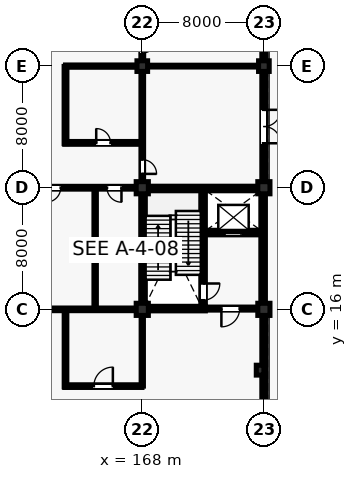
"""IFC4 building model, lengths in metres.
Left out: names, types, materials, properties, quantities, classifications, styles, units other than length and angle.
Written with IfcOpenShell. Run it as: python <this file> out.ifc"""

import sys

from ifc_helpers import new_model, si_unit, direction, frame, frame_2d, origin, origin_2d, place, context, subcontext, project, spatial, rectangle, extrude, element, fill, save


model = new_model("IFC4")
c1 = context("Model", 3, precision=1e-05, world=origin(), true_north=direction((0.0, 1.0)))
c2 = subcontext(c1, "Body", "Model", "MODEL_VIEW")
j1 = project(units=[si_unit("LENGTHUNIT", "METRE"), si_unit("PLANEANGLEUNIT", "RADIAN")], contexts=[c1])
p1 = place(None, origin())
s1 = spatial("IfcSite", under=j1, at=p1, CompositionType="ELEMENT")
p2 = place(p1, origin())
s2 = spatial("IfcBuilding", under=s1, at=p2, CompositionType="ELEMENT")
p3 = place(p2, origin())
s3 = spatial("IfcBuildingStorey", under=s2, at=p3, CompositionType="ELEMENT", Elevation=0.0)
for number, where, z_axis, x_axis in (
    (1, (168.0, 16.0, 0.0), (0.0, 0.0, 1.0), (1.0, 0.0, 0.0)),
    (2, (168.0, 24.0, 0.0), (0.0, 0.0, 1.0), (1.0, 0.0, 0.0)),
):
    element("IfcColumn", number, at=place(p3, frame(where, z_axis=z_axis, x_axis=x_axis)), inside=s3, PredefinedType="COLUMN", context=c2, shape_type="SweptSolid", body=[
        extrude(rectangle(XDim=0.8, YDim=0.8, at=origin_2d()), origin(), (0.0, 0.0, 1.0), 5.28),
    ])
p4 = place(p3, frame((168.0, 32.0, 0.0), z_axis=(0.0, 0.0, 1.0), x_axis=(1.0, 0.0, 0.0)))
e3 = element("IfcColumn", 3, at=p4, inside=s3, PredefinedType="COLUMN", context=c2, shape_type="SweptSolid", body=[
    extrude(rectangle(XDim=0.7, YDim=0.7, at=origin_2d()), origin(), (0.0, 0.0, 1.0), 5.28),
])
for number, where, z_axis, x_axis in (
    (4, (176.0, 16.0, 0.0), (0.0, 0.0, 1.0), (1.0, 0.0, 0.0)),
    (5, (176.0, 24.0, 0.0), (0.0, 0.0, 1.0), (1.0, 0.0, 0.0)),
):
    element("IfcColumn", number, at=place(p3, frame(where, z_axis=z_axis, x_axis=x_axis)), inside=s3, PredefinedType="COLUMN", context=c2, shape_type="SweptSolid", body=[
        extrude(rectangle(XDim=0.8, YDim=0.8, at=origin_2d()), origin(), (0.0, 0.0, 1.0), 5.28),
    ])
p5 = place(p3, frame((176.0, 32.0, 0.0), z_axis=(0.0, 0.0, 1.0), x_axis=(1.0, 0.0, 0.0)))
e6 = element("IfcColumn", 6, at=p5, inside=s3, PredefinedType="COLUMN", context=c2, shape_type="SweptSolid", body=[
    extrude(rectangle(XDim=0.7, YDim=0.7, at=origin_2d()), origin(), (0.0, 0.0, 1.0), 5.28),
])
p6 = place(p3, frame((175.75, 12.0, 0.0), z_axis=(0.0, 0.0, 1.0), x_axis=(1.0, 0.0, 0.0)))
e7 = element("IfcColumn", 7, at=p6, inside=s3, PredefinedType="PILASTER", context=c2, shape_type="SweptSolid", body=[
    extrude(rectangle(XDim=0.5, YDim=0.65, at=origin_2d()), origin(), (0.0, 0.0, 1.0), 5.28),
])
p7 = place(p3, frame((176.0, 8.335, 0.0), z_axis=(0.0, 0.0, 1.0), x_axis=(0.0, 1.0, 0.0)))
e8 = element("IfcWall", 8, at=p7, inside=s3, PredefinedType="SOLIDWALL", context=c2, shape_type="SweptSolid", body=[
    extrude(rectangle(XDim=7.28, YDim=0.27, at=frame_2d((3.64, 0.0))), origin(), (0.0, 0.0, 1.0), 4.677),
])
p8 = place(p7, frame((4.25, 0.0, 0.9)))
e9 = element("IfcOpeningElement", 9, at=p8, cuts=e8, PredefinedType="OPENING", context=c2, shape_type="SweptSolid", body=[
    extrude(rectangle(XDim=1.85, YDim=2.65, at=frame_2d((0.925, 1.325))), frame((0.0, 0.145, 0.0), z_axis=(0.0, -1.0, 0.0), x_axis=(1.0, 0.0, 0.0)), (0.0, 0.0, 1.0), 0.29),
])
p9 = place(p3, frame((176.0, 24.385, 0.0), z_axis=(0.0, 0.0, 1.0), x_axis=(0.0, 1.0, 0.0)))
e10 = element("IfcWall", 10, at=p9, inside=s3, PredefinedType="SOLIDWALL", context=c2, shape_type="SweptSolid", body=[
    extrude(rectangle(XDim=7.28, YDim=0.27, at=frame_2d((3.64, 0.0))), origin(), (0.0, 0.0, 1.0), 4.674),
])
p10 = place(p9, frame((2.54, 0.0, 0.0)))
e11 = element("IfcOpeningElement", 11, at=p10, cuts=e10, PredefinedType="OPENING", context=c2, shape_type="SweptSolid", body=[
    extrude(rectangle(XDim=2.2, YDim=2.5, at=frame_2d((1.1, 1.25))), frame((0.0, 0.145, 0.0), z_axis=(0.0, -1.0, 0.0), x_axis=(1.0, 0.0, 0.0)), (0.0, 0.0, 1.0), 0.29),
])
p11 = place(p3, frame((176.0, 32.335, 0.0), z_axis=(0.0, 0.0, 1.0), x_axis=(0.0, 1.0, 0.0)))
e12 = element("IfcWall", 12, at=p11, inside=s3, PredefinedType="SOLIDWALL", context=c2, shape_type="SweptSolid", body=[
    extrude(rectangle(XDim=7.33, YDim=0.27, at=frame_2d((3.665, 0.0))), origin(), (0.0, 0.0, 1.0), 4.614),
])
p12 = place(p11, frame((4.25, 0.0, 0.9)))
e13 = element("IfcOpeningElement", 13, at=p12, cuts=e12, PredefinedType="OPENING", context=c2, shape_type="SweptSolid", body=[
    extrude(rectangle(XDim=2.15, YDim=2.8, at=frame_2d((1.075, 1.4))), frame((0.0, 0.145, 0.0), z_axis=(0.0, -1.0, 0.0), x_axis=(1.0, 0.0, 0.0)), (0.0, 0.0, 1.0), 0.29),
])
for number, where, z_axis, x_axis in (
    (14, (168.05, 16.29, 0.0), (0.0, 0.0, 1.0), (0.0, 1.0, 0.0)),
    (15, (168.29, 23.95, 0.0), (0.0, 0.0, 1.0), (1.0, 0.0, 0.0)),
    (16, (175.95, 16.29, 0.0), (0.0, 0.0, 1.0), (0.0, 1.0, 0.0)),
):
    element("IfcWall", number, at=place(p3, frame(where, z_axis=z_axis, x_axis=x_axis)), inside=s3, PredefinedType="SHEAR", context=c2, shape_type="SweptSolid", body=[
        extrude(rectangle(XDim=7.42, YDim=0.3, at=frame_2d((3.71, 0.0))), origin(), (0.0, 0.0, 1.0), 5.035),
    ])
p13 = place(p3, frame((168.29, 16.05, 0.0), z_axis=(0.0, 0.0, 1.0), x_axis=(1.0, 0.0, 0.0)))
e17 = element("IfcWall", 17, at=p13, inside=s3, PredefinedType="SHEAR", context=c2, shape_type="SweptSolid", body=[
    extrude(rectangle(XDim=3.86, YDim=0.3, at=frame_2d((1.93, 0.0))), origin(), (0.0, 0.0, 1.0), 5.035),
])
p14 = place(p3, frame((172.0, 16.05, 0.0), z_axis=(0.0, 0.0, 1.0), x_axis=(0.0, 1.0, 0.0)))
e18 = element("IfcWall", 18, at=p14, inside=s3, PredefinedType="SHEAR", context=c2, shape_type="SweptSolid", body=[
    extrude(rectangle(XDim=7.9, YDim=0.3, at=frame_2d((3.95, 0.0))), origin(), (0.0, 0.0, 1.0), 5.035),
])
p15 = place(p14, frame((0.55, 0.0, 0.0)))
e19 = element("IfcOpeningElement", 19, at=p15, cuts=e18, PredefinedType="OPENING", context=c2, shape_type="SweptSolid", body=[
    extrude(rectangle(XDim=1.1, YDim=2.15, at=frame_2d((0.55, 1.075))), frame((0.0, 0.16, 0.0), z_axis=(0.0, -1.0, 0.0), x_axis=(1.0, 0.0, 0.0)), (0.0, 0.0, 1.0), 0.32),
])
p16 = place(p3, frame((172.0, 21.05, 0.0), z_axis=(0.0, 0.0, 1.0), x_axis=(1.0, 0.0, 0.0)))
e20 = element("IfcWall", 20, at=p16, inside=s3, PredefinedType="SHEAR", context=c2, shape_type="SweptSolid", body=[
    extrude(rectangle(XDim=3.95, YDim=0.3, at=frame_2d((1.975, 0.0))), origin(), (0.0, 0.0, 1.0), 5.035),
])
p17 = place(p16, frame((1.425, 0.0, 0.0)))
e21 = element("IfcOpeningElement", 21, at=p17, cuts=e20, PredefinedType="OPENING", context=c2, shape_type="SweptSolid", body=[
    extrude(rectangle(XDim=1.1, YDim=2.2, at=frame_2d((0.55, 1.1))), frame((0.0, 0.16, 0.0), z_axis=(0.0, -1.0, 0.0), x_axis=(1.0, 0.0, 0.0)), (0.0, 0.0, 1.0), 0.32),
])
p18 = place(p3, frame((172.0, 16.05, 0.0), z_axis=(0.0, 0.0, 1.0), x_axis=(1.0, 0.0, 0.0)))
e22 = element("IfcWall", 22, at=p18, inside=s3, PredefinedType="PARTITIONING", context=c2, shape_type="SweptSolid", body=[
    extrude(rectangle(XDim=3.61, YDim=0.2, at=frame_2d((1.805, 0.0))), origin(), (0.0, 0.0, 1.0), 4.404),
])
p19 = place(p18, frame((1.205, 0.0, 0.0)))
e23 = element("IfcOpeningElement", 23, at=p19, cuts=e22, PredefinedType="OPENING", context=c2, shape_type="SweptSolid", body=[
    extrude(rectangle(XDim=1.2, YDim=2.15, at=frame_2d((0.6, 1.075))), frame((0.0, 0.11, 0.0), z_axis=(0.0, -1.0, 0.0), x_axis=(1.0, 0.0, 0.0)), (0.0, 0.0, 1.0), 0.22),
])
p20 = place(p3, frame((162.9, 10.95, 0.0), z_axis=(0.0, 0.0, 1.0), x_axis=(1.0, 0.0, 0.0)))
e24 = element("IfcWall", 24, at=p20, inside=s3, PredefinedType="PARTITIONING", context=c2, shape_type="SweptSolid", body=[
    extrude(rectangle(XDim=5.08, YDim=0.175, at=frame_2d((2.54, 0.0))), origin(), (0.0, 0.0, 1.0), 4.404),
])
p21 = place(p20, frame((1.915, 0.0, 0.0)))
e25 = element("IfcOpeningElement", 25, at=p21, cuts=e24, PredefinedType="OPENING", context=c2, shape_type="SweptSolid", body=[
    extrude(rectangle(XDim=1.25, YDim=2.18, at=frame_2d((0.625, 1.09))), frame((0.0, 0.097, 0.0), z_axis=(0.0, -1.0, 0.0), x_axis=(1.0, 0.0, 0.0)), (0.0, 0.0, 1.0), 0.195),
])
p22 = place(p3, frame((162.95, 10.9, 0.0), z_axis=(0.0, 0.0, 1.0), x_axis=(0.0, 1.0, 0.0)))
e26 = element("IfcWall", 26, at=p22, inside=s3, PredefinedType="PARTITIONING", context=c2, shape_type="SweptSolid", body=[
    extrude(rectangle(XDim=5.08, YDim=0.175, at=frame_2d((2.54, 0.0))), origin(), (0.0, 0.0, 1.0), 4.336),
])
p23 = place(p3, frame((168.0, 10.95, 0.0), z_axis=(0.0, 0.0, 1.0), x_axis=(0.0, 1.0, 0.0)))
e27 = element("IfcWall", 27, at=p23, inside=s3, PredefinedType="PARTITIONING", context=c2, shape_type="SweptSolid", body=[
    extrude(rectangle(XDim=4.64, YDim=0.15, at=frame_2d((2.32, 0.0))), origin(), (0.0, 0.0, 1.0), 4.404),
])
p24 = place(p3, frame((162.9, 26.95, 0.0), z_axis=(0.0, 0.0, 1.0), x_axis=(1.0, 0.0, 0.0)))
e28 = element("IfcWall", 28, at=p24, inside=s3, PredefinedType="PARTITIONING", context=c2, shape_type="SweptSolid", body=[
    extrude(rectangle(XDim=5.08, YDim=0.185, at=frame_2d((2.54, 0.0))), origin(), (0.0, 0.0, 1.0), 4.403),
])
p25 = place(p24, frame((2.07, 0.0, 0.0)))
e29 = element("IfcOpeningElement", 29, at=p25, cuts=e28, PredefinedType="OPENING", context=c2, shape_type="SweptSolid", body=[
    extrude(rectangle(XDim=0.94, YDim=2.12, at=frame_2d((0.47, 1.06))), frame((0.0, 0.103, 0.0), z_axis=(0.0, -1.0, 0.0), x_axis=(1.0, 0.0, 0.0)), (0.0, 0.0, 1.0), 0.205),
])
p26 = place(p3, frame((162.95, 26.9, 0.0), z_axis=(0.0, 0.0, 1.0), x_axis=(0.0, 1.0, 0.0)))
e30 = element("IfcWall", 30, at=p26, inside=s3, PredefinedType="PARTITIONING", context=c2, shape_type="SweptSolid", body=[
    extrude(rectangle(XDim=5.08, YDim=0.185, at=frame_2d((2.54, 0.0))), origin(), (0.0, 0.0, 1.0), 4.327),
])
p27 = place(p3, frame((162.95, 32.0, 0.0), z_axis=(0.0, 0.0, 1.0), x_axis=(1.0, 0.0, 0.0)))
e31 = element("IfcWall", 31, at=p27, inside=s3, PredefinedType="PARTITIONING", context=c2, shape_type="SweptSolid", body=[
    extrude(rectangle(XDim=4.69, YDim=0.15, at=frame_2d((2.345, 0.0))), origin(), (0.0, 0.0, 1.0), 4.327),
])
p28 = place(p3, frame((160.34, 16.0, 0.0), z_axis=(0.0, 0.0, 1.0), x_axis=(1.0, 0.0, 0.0)))
e32 = element("IfcWall", 32, at=p28, inside=s3, PredefinedType="PARTITIONING", context=c2, shape_type="SweptSolid", body=[
    extrude(rectangle(XDim=7.27, YDim=0.175, at=frame_2d((3.635, 0.0))), origin(), (0.0, 0.0, 1.0), 4.336),
])
p29 = place(p28, frame((0.52, 0.0, 0.0)))
e33 = element("IfcOpeningElement", 33, at=p29, cuts=e32, PredefinedType="OPENING", context=c2, shape_type="SweptSolid", body=[
    extrude(rectangle(XDim=0.94, YDim=2.12, at=frame_2d((0.47, 1.06))), frame((0.0, 0.097, 0.0), z_axis=(0.0, -1.0, 0.0), x_axis=(1.0, 0.0, 0.0)), (0.0, 0.0, 1.0), 0.195),
])
p30 = place(p3, frame((160.34, 24.0, 0.0), z_axis=(0.0, 0.0, 1.0), x_axis=(1.0, 0.0, 0.0)))
e34 = element("IfcWall", 34, at=p30, inside=s3, PredefinedType="PARTITIONING", context=c2, shape_type="SweptSolid", body=[
    extrude(rectangle(XDim=7.27, YDim=0.185, at=frame_2d((3.635, 0.0))), origin(), (0.0, 0.0, 1.0), 4.404),
])
p31 = place(p30, frame((1.343, 0.0, 0.0)))
e35 = element("IfcOpeningElement", 35, at=p31, cuts=e34, PredefinedType="OPENING", context=c2, shape_type="SweptSolid", body=[
    extrude(rectangle(XDim=0.95, YDim=2.1, at=frame_2d((0.475, 1.05))), frame((0.0, 0.103, 0.0), z_axis=(0.0, -1.0, 0.0), x_axis=(1.0, 0.0, 0.0)), (0.0, 0.0, 1.0), 0.205),
])
p32 = place(p30, frame((5.341, 0.0, 0.0)))
e36 = element("IfcOpeningElement", 36, at=p32, cuts=e34, PredefinedType="OPENING", context=c2, shape_type="SweptSolid", body=[
    extrude(rectangle(XDim=0.95, YDim=2.1, at=frame_2d((0.475, 1.05))), frame((0.0, 0.103, 0.0), z_axis=(0.0, -1.0, 0.0), x_axis=(1.0, 0.0, 0.0)), (0.0, 0.0, 1.0), 0.205),
])
p33 = place(p3, frame((168.0, 24.39, 0.0), z_axis=(0.0, 0.0, 1.0), x_axis=(0.0, 1.0, 0.0)))
e37 = element("IfcWall", 37, at=p33, inside=s3, PredefinedType="PARTITIONING", context=c2, shape_type="SweptSolid", body=[
    extrude(rectangle(XDim=7.27, YDim=0.175, at=frame_2d((3.635, 0.0))), origin(), (0.0, 0.0, 1.0), 4.403),
])
p34 = place(p33, frame((0.52, 0.0, 0.0)))
e38 = element("IfcOpeningElement", 38, at=p34, cuts=e37, PredefinedType="OPENING", context=c2, shape_type="SweptSolid", body=[
    extrude(rectangle(XDim=0.94, YDim=2.12, at=frame_2d((0.47, 1.06))), frame((0.0, 0.097, 0.0), z_axis=(0.0, -1.0, 0.0), x_axis=(1.0, 0.0, 0.0)), (0.0, 0.0, 1.0), 0.195),
])
p35 = place(p3, frame((168.0, 32.34, 0.0), z_axis=(0.0, 0.0, 1.0), x_axis=(0.0, 1.0, 0.0)))
e39 = element("IfcWall", 39, at=p35, inside=s3, PredefinedType="PARTITIONING", context=c2, shape_type="SweptSolid", body=[
    extrude(rectangle(XDim=7.32, YDim=0.185, at=frame_2d((3.66, 0.0))), origin(), (0.0, 0.0, 1.0), 4.412),
])
p36 = place(p35, frame((0.52, 0.0, 0.0)))
e40 = element("IfcOpeningElement", 40, at=p36, cuts=e39, PredefinedType="OPENING", context=c2, shape_type="SweptSolid", body=[
    extrude(rectangle(XDim=0.94, YDim=2.12, at=frame_2d((0.47, 1.06))), frame((0.0, 0.103, 0.0), z_axis=(0.0, -1.0, 0.0), x_axis=(1.0, 0.0, 0.0)), (0.0, 0.0, 1.0), 0.205),
])
p37 = place(p3, frame((168.34, 32.0, 0.0), z_axis=(0.0, 0.0, 1.0), x_axis=(1.0, 0.0, 0.0)))
e41 = element("IfcWall", 41, at=p37, inside=s3, PredefinedType="PARTITIONING", context=c2, shape_type="SweptSolid", body=[
    extrude(rectangle(XDim=7.32, YDim=0.12, at=frame_2d((3.66, 0.0))), origin(), (0.0, 0.0, 1.0), 4.403),
])
p38 = place(p3, frame((164.9, 16.02, 0.0), z_axis=(0.0, 0.0, 1.0), x_axis=(0.0, 1.0, 0.0)))
e42 = element("IfcWall", 42, at=p38, inside=s3, PredefinedType="PARTITIONING", context=c2, shape_type="SweptSolid", body=[
    extrude(rectangle(XDim=7.96, YDim=0.16, at=frame_2d((3.98, 0.0))), origin(), (0.0, 0.0, 1.0), 4.336),
])
p39 = place(p8, origin())
e43 = element("IfcWindow", 43, at=p39, inside=s3, PartitioningType="SINGLE_PANEL", PredefinedType="WINDOW", context=c2, shape_type="SweptSolid", body=[
    extrude(rectangle(XDim=1.85, YDim=2.65, at=frame_2d((0.925, 1.325))), frame((0.0, 0.03, 0.0), z_axis=(0.0, -1.0, 0.0), x_axis=(1.0, 0.0, 0.0)), (0.0, 0.0, 1.0), 0.06),
])
fill(e9, e43)
p40 = place(p10, frame((2.2, 0.0, 0.0), z_axis=(0.0, 0.0, 1.0), x_axis=(-1.0, 0.0, 0.0)))
e44 = element("IfcDoor", 44, at=p40, inside=s3, OperationType="DOUBLE_DOOR_SINGLE_SWING", PredefinedType="DOOR", context=c2, shape_type="SweptSolid", body=[
    extrude(rectangle(XDim=2.2, YDim=2.5, at=frame_2d((1.1, 1.25))), frame((0.0, 0.025, 0.0), z_axis=(0.0, -1.0, 0.0), x_axis=(1.0, 0.0, 0.0)), (0.0, 0.0, 1.0), 0.05),
])
fill(e11, e44)
p41 = place(p15, frame((1.1, 0.0, 0.0), z_axis=(0.0, 0.0, 1.0), x_axis=(-1.0, 0.0, 0.0)))
e45 = element("IfcDoor", 45, at=p41, inside=s3, OperationType="SINGLE_SWING_RIGHT", PredefinedType="DOOR", context=c2, shape_type="SweptSolid", body=[
    extrude(rectangle(XDim=1.1, YDim=2.15, at=frame_2d((0.55, 1.075))), frame((0.0, 0.025, 0.0), z_axis=(0.0, -1.0, 0.0), x_axis=(1.0, 0.0, 0.0)), (0.0, 0.0, 1.0), 0.05),
])
fill(e19, e45)
p42 = place(p17, origin())
e46 = element("IfcDoor", 46, at=p42, inside=s3, OperationType="SLIDING_TO_LEFT", PredefinedType="DOOR", context=c2, shape_type="SweptSolid", body=[
    extrude(rectangle(XDim=1.1, YDim=2.2, at=frame_2d((0.55, 1.1))), frame((0.0, 0.025, 0.0), z_axis=(0.0, -1.0, 0.0), x_axis=(1.0, 0.0, 0.0)), (0.0, 0.0, 1.0), 0.05),
])
fill(e21, e46)
p43 = place(p19, frame((1.2, 0.0, 0.0), z_axis=(0.0, 0.0, 1.0), x_axis=(-1.0, 0.0, 0.0)))
e47 = element("IfcDoor", 47, at=p43, inside=s3, OperationType="SINGLE_SWING_LEFT", PredefinedType="DOOR", context=c2, shape_type="SweptSolid", body=[
    extrude(rectangle(XDim=1.2, YDim=2.15, at=frame_2d((0.6, 1.075))), frame((0.0, 0.025, 0.0), z_axis=(0.0, -1.0, 0.0), x_axis=(1.0, 0.0, 0.0)), (0.0, 0.0, 1.0), 0.05),
])
fill(e23, e47)
p44 = place(p21, origin())
e48 = element("IfcDoor", 48, at=p44, inside=s3, OperationType="SINGLE_SWING_RIGHT", PredefinedType="DOOR", context=c2, shape_type="SweptSolid", body=[
    extrude(rectangle(XDim=1.25, YDim=2.18, at=frame_2d((0.625, 1.09))), frame((0.0, 0.025, 0.0), z_axis=(0.0, -1.0, 0.0), x_axis=(1.0, 0.0, 0.0)), (0.0, 0.0, 1.0), 0.05),
])
fill(e25, e48)
p45 = place(p25, origin())
e49 = element("IfcDoor", 49, at=p45, inside=s3, OperationType="SINGLE_SWING_LEFT", PredefinedType="DOOR", context=c2, shape_type="SweptSolid", body=[
    extrude(rectangle(XDim=0.94, YDim=2.12, at=frame_2d((0.47, 1.06))), frame((0.0, 0.025, 0.0), z_axis=(0.0, -1.0, 0.0), x_axis=(1.0, 0.0, 0.0)), (0.0, 0.0, 1.0), 0.05),
])
fill(e29, e49)
p46 = place(p31, frame((0.95, 0.0, 0.0), z_axis=(0.0, 0.0, 1.0), x_axis=(-1.0, 0.0, 0.0)))
e50 = element("IfcDoor", 50, at=p46, inside=s3, OperationType="SINGLE_SWING_LEFT", PredefinedType="DOOR", context=c2, shape_type="SweptSolid", body=[
    extrude(rectangle(XDim=0.95, YDim=2.1, at=frame_2d((0.475, 1.05))), frame((0.0, 0.025, 0.0), z_axis=(0.0, -1.0, 0.0), x_axis=(1.0, 0.0, 0.0)), (0.0, 0.0, 1.0), 0.05),
])
fill(e35, e50)
p47 = place(p32, frame((0.95, 0.0, 0.0), z_axis=(0.0, 0.0, 1.0), x_axis=(-1.0, 0.0, 0.0)))
e51 = element("IfcDoor", 51, at=p47, inside=s3, OperationType="SINGLE_SWING_RIGHT", PredefinedType="DOOR", context=c2, shape_type="SweptSolid", body=[
    extrude(rectangle(XDim=0.95, YDim=2.1, at=frame_2d((0.475, 1.05))), frame((0.0, 0.025, 0.0), z_axis=(0.0, -1.0, 0.0), x_axis=(1.0, 0.0, 0.0)), (0.0, 0.0, 1.0), 0.05),
])
fill(e36, e51)
p48 = place(p34, frame((0.94, 0.0, 0.0), z_axis=(0.0, 0.0, 1.0), x_axis=(-1.0, 0.0, 0.0)))
e52 = element("IfcDoor", 52, at=p48, inside=s3, OperationType="SINGLE_SWING_LEFT", PredefinedType="DOOR", context=c2, shape_type="SweptSolid", body=[
    extrude(rectangle(XDim=0.94, YDim=2.12, at=frame_2d((0.47, 1.06))), frame((0.0, 0.025, 0.0), z_axis=(0.0, -1.0, 0.0), x_axis=(1.0, 0.0, 0.0)), (0.0, 0.0, 1.0), 0.05),
])
fill(e38, e52)
p49 = place(p36, frame((0.94, 0.0, 0.0), z_axis=(0.0, 0.0, 1.0), x_axis=(-1.0, 0.0, 0.0)))
e53 = element("IfcDoor", 53, at=p49, inside=s3, OperationType="SINGLE_SWING_RIGHT", PredefinedType="DOOR", context=c2, shape_type="SweptSolid", body=[
    extrude(rectangle(XDim=0.94, YDim=2.12, at=frame_2d((0.47, 1.06))), frame((0.0, 0.025, 0.0), z_axis=(0.0, -1.0, 0.0), x_axis=(1.0, 0.0, 0.0)), (0.0, 0.0, 1.0), 0.05),
])
fill(e40, e53)
save(model, sys.argv[1])
